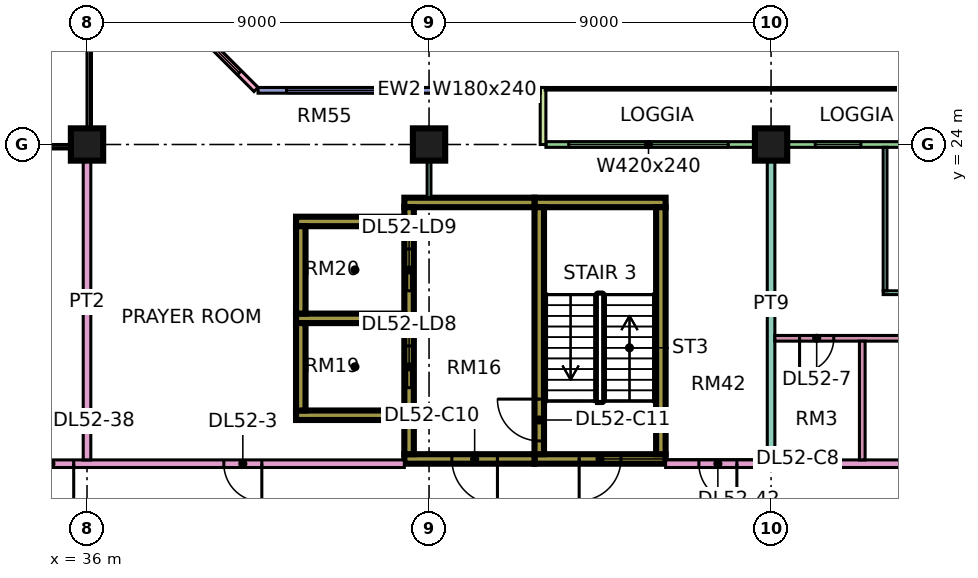
"""IFC4 building model, lengths in metres.
Left out: names, types, materials, properties, quantities, classifications, styles, units other than length and angle.
Written with IfcOpenShell. Run it as: python <this file> out.ifc"""

import sys

from ifc_helpers import new_model, si_unit, direction, frame, frame_2d, origin, origin_2d, place, context, subcontext, project, spatial, rectangle, extrude, element, fill, save


model = new_model("IFC4")
c1 = context("Model", 3, precision=1e-05, world=origin(), true_north=direction((0.0, 1.0)))
c2 = subcontext(c1, "Body", "Model", "MODEL_VIEW")
j1 = project(units=[si_unit("LENGTHUNIT", "METRE"), si_unit("PLANEANGLEUNIT", "RADIAN")], contexts=[c1])
p1 = place(None, origin())
s1 = spatial("IfcSite", under=j1, at=p1, CompositionType="ELEMENT")
p2 = place(p1, origin())
s2 = spatial("IfcBuilding", under=s1, at=p2, CompositionType="ELEMENT")
p3 = place(p2, frame((0.0, 0.0, 222.9)))
s3 = spatial("IfcBuildingStorey", under=s2, at=p3, CompositionType="ELEMENT", Elevation=222.9)
for number, where, z_axis, x_axis in (
    (1, (36.0, 24.0, 0.0), (0.0, 0.0, 1.0), (1.0, 0.0, 0.0)),
    (2, (45.0, 24.0, 0.0), (0.0, 0.0, 1.0), (1.0, 0.0, 0.0)),
    (3, (54.0, 24.0, 0.0), (0.0, 0.0, 1.0), (1.0, 0.0, 0.0)),
):
    element("IfcColumn", number, at=place(p3, frame(where, z_axis=z_axis, x_axis=x_axis)), inside=s3, PredefinedType="COLUMN", context=c2, shape_type="SweptSolid", body=[
        extrude(rectangle(XDim=0.85, YDim=0.85, at=origin_2d()), origin(), (0.0, 0.0, 1.0), 3.75),
    ])
p4 = place(p3, frame((47.775, 15.725, 0.0), z_axis=(0.0, 0.0, 1.0), x_axis=(1.0, 0.0, 0.0)))
e4 = element("IfcWall", 4, at=p4, inside=s3, PredefinedType="SHEAR", context=c2, shape_type="SweptSolid", body=[
    extrude(rectangle(XDim=3.45, YDim=0.25, at=frame_2d((1.725, 0.0))), origin(), (0.0, 0.0, 1.0), 3.75),
])
p5 = place(p4, frame((1.175, 0.0, 0.0)))
e5 = element("IfcOpeningElement", 5, at=p5, cuts=e4, PredefinedType="OPENING", context=c2, shape_type="SweptSolid", body=[
    extrude(rectangle(XDim=1.1, YDim=2.2, at=frame_2d((0.55, 1.1))), frame((0.0, 0.135, 0.0), z_axis=(0.0, -1.0, 0.0), x_axis=(1.0, 0.0, 0.0)), (0.0, 0.0, 1.0), 0.27),
])
p6 = place(p3, frame((47.775, 22.475, 0.0), z_axis=(0.0, 0.0, 1.0), x_axis=(1.0, 0.0, 0.0)))
e6 = element("IfcWall", 6, at=p6, inside=s3, PredefinedType="SHEAR", context=c2, shape_type="SweptSolid", body=[
    extrude(rectangle(XDim=3.45, YDim=0.25, at=frame_2d((1.725, 0.0))), origin(), (0.0, 0.0, 1.0), 3.75),
])
p7 = place(p3, frame((47.9, 15.85, 0.0), z_axis=(0.0, 0.0, 1.0), x_axis=(0.0, 1.0, 0.0)))
e7 = element("IfcWall", 7, at=p7, inside=s3, PredefinedType="SHEAR", context=c2, shape_type="SweptSolid", body=[
    extrude(rectangle(XDim=6.5, YDim=0.25, at=frame_2d((3.25, 0.0))), origin(), (0.0, 0.0, 1.0), 3.75),
])
p8 = place(p7, frame((0.35, 0.0, 0.0)))
e8 = element("IfcOpeningElement", 8, at=p8, cuts=e7, PredefinedType="OPENING", context=c2, shape_type="SweptSolid", body=[
    extrude(rectangle(XDim=1.1, YDim=2.2, at=frame_2d((0.55, 1.1))), frame((0.0, 0.135, 0.0), z_axis=(0.0, -1.0, 0.0), x_axis=(1.0, 0.0, 0.0)), (0.0, 0.0, 1.0), 0.27),
])
p9 = place(p3, frame((51.1, 15.85, 0.0), z_axis=(0.0, 0.0, 1.0), x_axis=(0.0, 1.0, 0.0)))
e9 = element("IfcWall", 9, at=p9, inside=s3, PredefinedType="SHEAR", context=c2, shape_type="SweptSolid", body=[
    extrude(rectangle(XDim=6.5, YDim=0.25, at=frame_2d((3.25, 0.0))), origin(), (0.0, 0.0, 1.0), 3.75),
])
p10 = place(p3, frame((44.35, 15.725, 0.0), z_axis=(0.0, 0.0, 1.0), x_axis=(1.0, 0.0, 0.0)))
e10 = element("IfcWall", 10, at=p10, inside=s3, PredefinedType="SHEAR", context=c2, shape_type="SweptSolid", body=[
    extrude(rectangle(XDim=3.425, YDim=0.25, at=frame_2d((1.712, 0.0))), origin(), (0.0, 0.0, 1.0), 3.75),
])
p11 = place(p10, frame((1.25, 0.0, 0.0)))
e11 = element("IfcOpeningElement", 11, at=p11, cuts=e10, PredefinedType="OPENING", context=c2, shape_type="SweptSolid", body=[
    extrude(rectangle(XDim=1.2, YDim=2.2, at=frame_2d((0.6, 1.1))), frame((0.0, 0.135, 0.0), z_axis=(0.0, -1.0, 0.0), x_axis=(1.0, 0.0, 0.0)), (0.0, 0.0, 1.0), 0.27),
])
p12 = place(p3, frame((44.35, 22.475, 0.0), z_axis=(0.0, 0.0, 1.0), x_axis=(1.0, 0.0, 0.0)))
e12 = element("IfcWall", 12, at=p12, inside=s3, PredefinedType="SHEAR", context=c2, shape_type="SweptSolid", body=[
    extrude(rectangle(XDim=3.425, YDim=0.25, at=frame_2d((1.712, 0.0))), origin(), (0.0, 0.0, 1.0), 3.75),
])
p13 = place(p3, frame((44.475, 15.85, 0.0), z_axis=(0.0, 0.0, 1.0), x_axis=(0.0, 1.0, 0.0)))
e13 = element("IfcWall", 13, at=p13, inside=s3, PredefinedType="SHEAR", context=c2, shape_type="SweptSolid", body=[
    extrude(rectangle(XDim=6.5, YDim=0.25, at=frame_2d((3.25, 0.0))), origin(), (0.0, 0.0, 1.0), 3.75),
])
p14 = place(p13, frame((1.75, 0.0, 0.0)))
e14 = element("IfcOpeningElement", 14, at=p14, cuts=e13, PredefinedType="OPENING", context=c2, shape_type="SweptSolid", body=[
    extrude(rectangle(XDim=1.1, YDim=2.2, at=frame_2d((0.55, 1.1))), frame((0.0, 0.135, 0.0), z_axis=(0.0, -1.0, 0.0), x_axis=(1.0, 0.0, 0.0)), (0.0, 0.0, 1.0), 0.27),
])
p15 = place(p13, frame((4.3, 0.0, 0.0)))
e15 = element("IfcOpeningElement", 15, at=p15, cuts=e13, PredefinedType="OPENING", context=c2, shape_type="SweptSolid", body=[
    extrude(rectangle(XDim=1.1, YDim=2.2, at=frame_2d((0.55, 1.1))), frame((0.0, 0.135, 0.0), z_axis=(0.0, -1.0, 0.0), x_axis=(1.0, 0.0, 0.0)), (0.0, 0.0, 1.0), 0.27),
])
for number, where, z_axis, x_axis in (
    (16, (41.5, 16.875, 0.0), (0.0, 0.0, 1.0), (1.0, 0.0, 0.0)),
    (17, (41.5, 19.425, 0.0), (0.0, 0.0, 1.0), (1.0, 0.0, 0.0)),
    (18, (41.5, 21.975, 0.0), (0.0, 0.0, 1.0), (1.0, 0.0, 0.0)),
):
    element("IfcWall", number, at=place(p3, frame(where, z_axis=z_axis, x_axis=x_axis)), inside=s3, PredefinedType="SHEAR", context=c2, shape_type="SweptSolid", body=[
        extrude(rectangle(XDim=2.85, YDim=0.25, at=frame_2d((1.425, 0.0))), origin(), (0.0, 0.0, 1.0), 3.75),
    ])
for number, where, z_axis, x_axis in (
    (19, (41.625, 17.0, 0.0), (0.0, 0.0, 1.0), (0.0, 1.0, 0.0)),
    (20, (41.625, 19.55, 0.0), (0.0, 0.0, 1.0), (0.0, 1.0, 0.0)),
):
    element("IfcWall", number, at=place(p3, frame(where, z_axis=z_axis, x_axis=x_axis)), inside=s3, PredefinedType="SHEAR", context=c2, shape_type="SweptSolid", body=[
        extrude(rectangle(XDim=2.3, YDim=0.25, at=frame_2d((1.15, 0.0))), origin(), (0.0, 0.0, 1.0), 3.75),
    ])
p16 = place(p3, frame((61.425, 24.0, 0.0), z_axis=(0.0, 0.0, 1.0), x_axis=(-1.0, 0.0, 0.0)))
e21 = element("IfcWall", 21, at=p16, inside=s3, PredefinedType="SOLIDWALL", context=c2, shape_type="SweptSolid", body=[
    extrude(rectangle(XDim=13.35, YDim=0.15, at=frame_2d((6.675, 0.0))), origin(), (0.0, 0.0, 1.0), 3.35),
])
p17 = place(p16, frame((0.262, 0.0, 0.45)))
e22 = element("IfcOpeningElement", 22, at=p17, cuts=e21, PredefinedType="OPENING", context=c2, shape_type="SweptSolid", body=[
    extrude(rectangle(XDim=0.9, YDim=2.4, at=frame_2d((0.45, 1.2))), frame((0.0, 0.085, 0.0), z_axis=(0.0, -1.0, 0.0), x_axis=(1.0, 0.0, 0.0)), (0.0, 0.0, 1.0), 0.17),
])
p18 = place(p16, frame((2.025, 0.0, 0.0)))
e23 = element("IfcOpeningElement", 23, at=p18, cuts=e21, PredefinedType="OPENING", context=c2, shape_type="SweptSolid", body=[
    extrude(rectangle(XDim=1.8, YDim=2.4, at=frame_2d((0.9, 1.2))), frame((0.0, 0.085, 0.0), z_axis=(0.0, -1.0, 0.0), x_axis=(1.0, 0.0, 0.0)), (0.0, 0.0, 1.0), 0.17),
])
p19 = place(p16, frame((5.062, 0.0, 0.45)))
e24 = element("IfcOpeningElement", 24, at=p19, cuts=e21, PredefinedType="OPENING", context=c2, shape_type="SweptSolid", body=[
    extrude(rectangle(XDim=1.2, YDim=2.4, at=frame_2d((0.6, 1.2))), frame((0.0, 0.085, 0.0), z_axis=(0.0, -1.0, 0.0), x_axis=(1.0, 0.0, 0.0)), (0.0, 0.0, 1.0), 0.17),
])
p20 = place(p16, frame((8.55, 0.0, 0.45)))
e25 = element("IfcOpeningElement", 25, at=p20, cuts=e21, PredefinedType="OPENING", context=c2, shape_type="SweptSolid", body=[
    extrude(rectangle(XDim=4.2, YDim=2.4, at=frame_2d((2.1, 1.2))), frame((0.0, 0.085, 0.0), z_axis=(0.0, -1.0, 0.0), x_axis=(1.0, 0.0, 0.0)), (0.0, 0.0, 1.0), 0.17),
])
p21 = place(p3, frame((48.0, 25.5, 0.0), z_axis=(0.0, 0.0, 1.0), x_axis=(0.0, -1.0, 0.0)))
e26 = element("IfcWall", 26, at=p21, inside=s3, PredefinedType="SOLIDWALL", context=c2, shape_type="SweptSolid", body=[
    extrude(rectangle(XDim=1.5, YDim=0.15, at=frame_2d((0.75, 0.0))), origin(), (0.0, 0.0, 1.0), 3.35),
])
p22 = place(p3, frame((47.925, 25.425, 0.0), z_axis=(0.0, 0.0, 1.0), x_axis=(-1.0, 0.0, 0.0)))
e27 = element("IfcWall", 27, at=p22, inside=s3, PredefinedType="SOLIDWALL", context=c2, shape_type="SweptSolid", body=[
    extrude(rectangle(XDim=7.425, YDim=0.15, at=frame_2d((3.712, 0.0))), origin(), (0.0, 0.0, 1.0), 3.35),
])
p23 = place(p22, frame((0.562, 0.0, 0.45)))
e28 = element("IfcOpeningElement", 28, at=p23, cuts=e27, PredefinedType="OPENING", context=c2, shape_type="SweptSolid", body=[
    extrude(rectangle(XDim=1.8, YDim=2.4, at=frame_2d((0.9, 1.2))), frame((0.0, 0.085, 0.0), z_axis=(0.0, -1.0, 0.0), x_axis=(1.0, 0.0, 0.0)), (0.0, 0.0, 1.0), 0.17),
])
p24 = place(p22, frame((3.675, 0.0, 0.45)))
e29 = element("IfcOpeningElement", 29, at=p24, cuts=e27, PredefinedType="OPENING", context=c2, shape_type="SweptSolid", body=[
    extrude(rectangle(XDim=3.0, YDim=2.4, at=frame_2d((1.5, 1.2))), frame((0.0, 0.085, 0.0), z_axis=(0.0, -1.0, 0.0), x_axis=(1.0, 0.0, 0.0)), (0.0, 0.0, 1.0), 0.17),
])
p25 = place(p3, frame((40.447, 25.447, 0.0), z_axis=(0.0, 0.0, 1.0), x_axis=(-0.707106781187, 0.707106781187, 0.0)))
e30 = element("IfcWall", 30, at=p25, inside=s3, PredefinedType="SOLIDWALL", context=c2, shape_type="SweptSolid", body=[
    extrude(rectangle(XDim=4.243, YDim=0.15, at=frame_2d((2.121, 0.0))), origin(), (0.0, 0.0, 1.0), 3.35),
])
p26 = place(p25, frame((0.621, 0.0, 0.45)))
e31 = element("IfcOpeningElement", 31, at=p26, cuts=e30, PredefinedType="OPENING", context=c2, shape_type="SweptSolid", body=[
    extrude(rectangle(XDim=3.0, YDim=2.4, at=frame_2d((1.5, 1.2))), frame((0.0, 0.085, 0.0), z_axis=(0.0, -1.0, 0.0), x_axis=(1.0, 0.0, 0.0)), (0.0, 0.0, 1.0), 0.17),
])
p27 = place(p3, frame((34.0, 15.6, 0.0), z_axis=(0.0, 0.0, 1.0), x_axis=(1.0, 0.0, 0.0)))
e32 = element("IfcWall", 32, at=p27, inside=s3, PredefinedType="PARTITIONING", context=c2, shape_type="SweptSolid", body=[
    extrude(rectangle(XDim=10.35, YDim=0.2, at=frame_2d((5.175, 0.0))), origin(), (0.0, 0.0, 1.0), 3.35),
])
p28 = place(p27, frame((5.6, 0.0, 0.0)))
e33 = element("IfcOpeningElement", 33, at=p28, cuts=e32, PredefinedType="OPENING", context=c2, shape_type="SweptSolid", body=[
    extrude(rectangle(XDim=1.0, YDim=2.1, at=frame_2d((0.5, 1.05))), frame((0.0, 0.11, 0.0), z_axis=(0.0, -1.0, 0.0), x_axis=(1.0, 0.0, 0.0)), (0.0, 0.0, 1.0), 0.22),
])
p29 = place(p27, frame((0.45, 0.0, 0.0)))
e34 = element("IfcOpeningElement", 34, at=p29, cuts=e32, PredefinedType="OPENING", context=c2, shape_type="SweptSolid", body=[
    extrude(rectangle(XDim=1.2, YDim=2.1, at=frame_2d((0.6, 1.05))), frame((0.0, 0.11, 0.0), z_axis=(0.0, -1.0, 0.0), x_axis=(1.0, 0.0, 0.0)), (0.0, 0.0, 1.0), 0.22),
])
p30 = place(p3, frame((36.0, 15.7, 0.0), z_axis=(0.0, 0.0, 1.0), x_axis=(0.0, 1.0, 0.0)))
e35 = element("IfcWall", 35, at=p30, inside=s3, PredefinedType="PARTITIONING", context=c2, shape_type="SweptSolid", body=[
    extrude(rectangle(XDim=8.3, YDim=0.2, at=frame_2d((4.15, 0.0))), origin(), (0.0, 0.0, 1.0), 3.35),
])
p31 = place(p3, frame((45.0, 22.6, 0.0), z_axis=(0.0, 0.0, 1.0), x_axis=(0.0, 1.0, 0.0)))
e36 = element("IfcWall", 36, at=p31, inside=s3, PredefinedType="PARTITIONING", context=c2, shape_type="SweptSolid", body=[
    extrude(rectangle(XDim=1.4, YDim=0.1, at=frame_2d((0.7, 0.0))), origin(), (0.0, 0.0, 1.0), 3.35),
])
p32 = place(p3, frame((51.225, 15.6, 0.0), z_axis=(0.0, 0.0, 1.0), x_axis=(1.0, 0.0, 0.0)))
e37 = element("IfcWall", 37, at=p32, inside=s3, PredefinedType="PARTITIONING", context=c2, shape_type="SweptSolid", body=[
    extrude(rectangle(XDim=13.125, YDim=0.2, at=frame_2d((6.562, 0.0))), origin(), (0.0, 0.0, 1.0), 3.35),
])
p33 = place(p32, frame((9.425, 0.0, 0.0)))
e38 = element("IfcOpeningElement", 38, at=p33, cuts=e37, PredefinedType="OPENING", context=c2, shape_type="SweptSolid", body=[
    extrude(rectangle(XDim=1.0, YDim=2.1, at=frame_2d((0.5, 1.05))), frame((0.0, 0.11, 0.0), z_axis=(0.0, -1.0, 0.0), x_axis=(1.0, 0.0, 0.0)), (0.0, 0.0, 1.0), 0.22),
])
p34 = place(p32, frame((0.875, 0.0, 0.0)))
e39 = element("IfcOpeningElement", 39, at=p34, cuts=e37, PredefinedType="OPENING", context=c2, shape_type="SweptSolid", body=[
    extrude(rectangle(XDim=1.0, YDim=2.1, at=frame_2d((0.5, 1.05))), frame((0.0, 0.11, 0.0), z_axis=(0.0, -1.0, 0.0), x_axis=(1.0, 0.0, 0.0)), (0.0, 0.0, 1.0), 0.22),
])
p35 = place(p3, frame((54.0, 15.7, 0.0), z_axis=(0.0, 0.0, 1.0), x_axis=(0.0, 1.0, 0.0)))
e40 = element("IfcWall", 40, at=p35, inside=s3, PredefinedType="PARTITIONING", context=c2, shape_type="SweptSolid", body=[
    extrude(rectangle(XDim=8.226, YDim=0.2, at=frame_2d((4.113, 0.0))), origin(), (0.0, 0.0, 1.0), 3.35),
])
p36 = place(p3, frame((54.1, 18.9, 0.0), z_axis=(0.0, 0.0, 1.0), x_axis=(1.0, 0.0, 0.0)))
e41 = element("IfcWall", 41, at=p36, inside=s3, PredefinedType="PARTITIONING", context=c2, shape_type="SweptSolid", body=[
    extrude(rectangle(XDim=5.375, YDim=0.15, at=frame_2d((2.688, 0.0))), origin(), (0.0, 0.0, 1.0), 3.35),
])
p37 = place(p36, frame((0.65, 0.0, 0.0)))
e42 = element("IfcOpeningElement", 42, at=p37, cuts=e41, PredefinedType="OPENING", context=c2, shape_type="SweptSolid", body=[
    extrude(rectangle(XDim=0.9, YDim=2.1, at=frame_2d((0.45, 1.05))), frame((0.0, 0.085, 0.0), z_axis=(0.0, -1.0, 0.0), x_axis=(1.0, 0.0, 0.0)), (0.0, 0.0, 1.0), 0.17),
])
p38 = place(p3, frame((56.4, 15.7, 0.0), z_axis=(0.0, 0.0, 1.0), x_axis=(0.0, 1.0, 0.0)))
e43 = element("IfcWall", 43, at=p38, inside=s3, PredefinedType="PARTITIONING", context=c2, shape_type="SweptSolid", body=[
    extrude(rectangle(XDim=3.125, YDim=0.15, at=frame_2d((1.562, 0.0))), origin(), (0.0, 0.0, 1.0), 3.35),
])
p39 = place(p3, frame((56.95, 20.1, 0.0), z_axis=(0.0, 0.0, 1.0), x_axis=(1.0, 0.0, 0.0)))
e44 = element("IfcWall", 44, at=p39, inside=s3, PredefinedType="PARTITIONING", context=c2, shape_type="SweptSolid", body=[
    extrude(rectangle(XDim=7.4, YDim=0.1, at=frame_2d((3.7, 0.0))), origin(), (0.0, 0.0, 1.0), 3.35),
])
p40 = place(p39, frame((1.1, 0.0, 0.0)))
e45 = element("IfcOpeningElement", 45, at=p40, cuts=e44, PredefinedType="OPENING", context=c2, shape_type="SweptSolid", body=[
    extrude(rectangle(XDim=0.9, YDim=2.1, at=frame_2d((0.45, 1.05))), frame((0.0, 0.06, 0.0), z_axis=(0.0, -1.0, 0.0), x_axis=(1.0, 0.0, 0.0)), (0.0, 0.0, 1.0), 0.12),
])
p41 = place(p39, frame((4.1, 0.0, 0.0)))
e46 = element("IfcOpeningElement", 46, at=p41, cuts=e44, PredefinedType="OPENING", context=c2, shape_type="SweptSolid", body=[
    extrude(rectangle(XDim=0.9, YDim=2.1, at=frame_2d((0.45, 1.05))), frame((0.0, 0.06, 0.0), z_axis=(0.0, -1.0, 0.0), x_axis=(1.0, 0.0, 0.0)), (0.0, 0.0, 1.0), 0.12),
])
p42 = place(p3, frame((57.0, 20.15, 0.0), z_axis=(0.0, 0.0, 1.0), x_axis=(0.0, 1.0, 0.0)))
e47 = element("IfcWall", 47, at=p42, inside=s3, PredefinedType="PARTITIONING", context=c2, shape_type="SweptSolid", body=[
    extrude(rectangle(XDim=3.776, YDim=0.1, at=frame_2d((1.888, 0.0))), origin(), (0.0, 0.0, 1.0), 3.35),
])
p43 = place(p19, origin())
e48 = element("IfcWindow", 48, at=p43, inside=s3, PartitioningType="SINGLE_PANEL", PredefinedType="WINDOW", context=c2, shape_type="SweptSolid", body=[
    extrude(rectangle(XDim=1.2, YDim=2.4, at=frame_2d((0.6, 1.2))), frame((0.0, 0.03, 0.0), z_axis=(0.0, -1.0, 0.0), x_axis=(1.0, 0.0, 0.0)), (0.0, 0.0, 1.0), 0.06),
])
fill(e24, e48)
p44 = place(p20, origin())
e49 = element("IfcWindow", 49, at=p44, inside=s3, PartitioningType="SINGLE_PANEL", PredefinedType="WINDOW", context=c2, shape_type="SweptSolid", body=[
    extrude(rectangle(XDim=4.2, YDim=2.4, at=frame_2d((2.1, 1.2))), frame((0.0, 0.03, 0.0), z_axis=(0.0, -1.0, 0.0), x_axis=(1.0, 0.0, 0.0)), (0.0, 0.0, 1.0), 0.06),
])
fill(e25, e49)
p45 = place(p23, origin())
e50 = element("IfcWindow", 50, at=p45, inside=s3, PartitioningType="SINGLE_PANEL", PredefinedType="WINDOW", context=c2, shape_type="SweptSolid", body=[
    extrude(rectangle(XDim=1.8, YDim=2.4, at=frame_2d((0.9, 1.2))), frame((0.0, 0.03, 0.0), z_axis=(0.0, -1.0, 0.0), x_axis=(1.0, 0.0, 0.0)), (0.0, 0.0, 1.0), 0.06),
])
fill(e28, e50)
p46 = place(p24, origin())
e51 = element("IfcWindow", 51, at=p46, inside=s3, PartitioningType="SINGLE_PANEL", PredefinedType="WINDOW", context=c2, shape_type="SweptSolid", body=[
    extrude(rectangle(XDim=3.0, YDim=2.4, at=frame_2d((1.5, 1.2))), frame((0.0, 0.03, 0.0), z_axis=(0.0, -1.0, 0.0), x_axis=(1.0, 0.0, 0.0)), (0.0, 0.0, 1.0), 0.06),
])
fill(e29, e51)
p47 = place(p26, origin())
e52 = element("IfcWindow", 52, at=p47, inside=s3, PartitioningType="SINGLE_PANEL", PredefinedType="WINDOW", context=c2, shape_type="SweptSolid", body=[
    extrude(rectangle(XDim=3.0, YDim=2.4, at=frame_2d((1.5, 1.2))), frame((0.0, 0.03, 0.0), z_axis=(0.0, -1.0, 0.0), x_axis=(1.0, 0.0, 0.0)), (0.0, 0.0, 1.0), 0.06),
])
fill(e31, e52)
p48 = place(p5, frame((1.1, 0.0, 0.0), z_axis=(0.0, 0.0, 1.0), x_axis=(-1.0, 0.0, 0.0)))
e53 = element("IfcDoor", 53, at=p48, inside=s3, OperationType="SINGLE_SWING_LEFT", PredefinedType="DOOR", context=c2, shape_type="SweptSolid", body=[
    extrude(rectangle(XDim=1.1, YDim=2.2, at=frame_2d((0.55, 1.1))), frame((0.0, 0.025, 0.0), z_axis=(0.0, -1.0, 0.0), x_axis=(1.0, 0.0, 0.0)), (0.0, 0.0, 1.0), 0.05),
])
fill(e5, e53)
p49 = place(p11, origin())
e54 = element("IfcDoor", 54, at=p49, inside=s3, OperationType="SINGLE_SWING_RIGHT", PredefinedType="DOOR", context=c2, shape_type="SweptSolid", body=[
    extrude(rectangle(XDim=1.2, YDim=2.2, at=frame_2d((0.6, 1.1))), frame((0.0, 0.025, 0.0), z_axis=(0.0, -1.0, 0.0), x_axis=(1.0, 0.0, 0.0)), (0.0, 0.0, 1.0), 0.05),
])
fill(e11, e54)
p50 = place(p8, frame((1.1, 0.0, 0.0), z_axis=(0.0, 0.0, 1.0), x_axis=(-1.0, 0.0, 0.0)))
e55 = element("IfcDoor", 55, at=p50, inside=s3, OperationType="SINGLE_SWING_RIGHT", PredefinedType="DOOR", context=c2, shape_type="SweptSolid", body=[
    extrude(rectangle(XDim=1.1, YDim=2.2, at=frame_2d((0.55, 1.1))), frame((0.0, 0.025, 0.0), z_axis=(0.0, -1.0, 0.0), x_axis=(1.0, 0.0, 0.0)), (0.0, 0.0, 1.0), 0.05),
])
fill(e8, e55)
p51 = place(p14, origin())
e56 = element("IfcDoor", 56, at=p51, inside=s3, OperationType="DOUBLE_DOOR_SLIDING", PredefinedType="DOOR", context=c2, shape_type="SweptSolid", body=[
    extrude(rectangle(XDim=1.1, YDim=2.2, at=frame_2d((0.55, 1.1))), frame((0.0, 0.025, 0.0), z_axis=(0.0, -1.0, 0.0), x_axis=(1.0, 0.0, 0.0)), (0.0, 0.0, 1.0), 0.05),
])
fill(e14, e56)
p52 = place(p15, origin())
e57 = element("IfcDoor", 57, at=p52, inside=s3, OperationType="DOUBLE_DOOR_SLIDING", PredefinedType="DOOR", context=c2, shape_type="SweptSolid", body=[
    extrude(rectangle(XDim=1.1, YDim=2.2, at=frame_2d((0.55, 1.1))), frame((0.0, 0.025, 0.0), z_axis=(0.0, -1.0, 0.0), x_axis=(1.0, 0.0, 0.0)), (0.0, 0.0, 1.0), 0.05),
])
fill(e15, e57)
p53 = place(p28, origin())
e58 = element("IfcDoor", 58, at=p53, inside=s3, OperationType="SINGLE_SWING_RIGHT", PredefinedType="DOOR", context=c2, shape_type="SweptSolid", body=[
    extrude(rectangle(XDim=1.0, YDim=2.1, at=frame_2d((0.5, 1.05))), frame((0.0, 0.025, 0.0), z_axis=(0.0, -1.0, 0.0), x_axis=(1.0, 0.0, 0.0)), (0.0, 0.0, 1.0), 0.05),
])
fill(e33, e58)
p54 = place(p37, frame((0.9, 0.0, 0.0), z_axis=(0.0, 0.0, 1.0), x_axis=(-1.0, 0.0, 0.0)))
e59 = element("IfcDoor", 59, at=p54, inside=s3, OperationType="SINGLE_SWING_LEFT", PredefinedType="DOOR", context=c2, shape_type="SweptSolid", body=[
    extrude(rectangle(XDim=0.9, YDim=2.1, at=frame_2d((0.45, 1.05))), frame((0.0, 0.025, 0.0), z_axis=(0.0, -1.0, 0.0), x_axis=(1.0, 0.0, 0.0)), (0.0, 0.0, 1.0), 0.05),
])
fill(e42, e59)
p55 = place(p29, origin())
e60 = element("IfcDoor", 60, at=p55, inside=s3, OperationType="SINGLE_SWING_RIGHT", PredefinedType="DOOR", context=c2, shape_type="SweptSolid", body=[
    extrude(rectangle(XDim=1.2, YDim=2.1, at=frame_2d((0.6, 1.05))), frame((0.0, 0.025, 0.0), z_axis=(0.0, -1.0, 0.0), x_axis=(1.0, 0.0, 0.0)), (0.0, 0.0, 1.0), 0.05),
])
fill(e34, e60)
p56 = place(p34, origin())
e61 = element("IfcDoor", 61, at=p56, inside=s3, OperationType="SINGLE_SWING_RIGHT", PredefinedType="DOOR", context=c2, shape_type="SweptSolid", body=[
    extrude(rectangle(XDim=1.0, YDim=2.1, at=frame_2d((0.5, 1.05))), frame((0.0, 0.025, 0.0), z_axis=(0.0, -1.0, 0.0), x_axis=(1.0, 0.0, 0.0)), (0.0, 0.0, 1.0), 0.05),
])
fill(e39, e61)
save(model, sys.argv[1])
